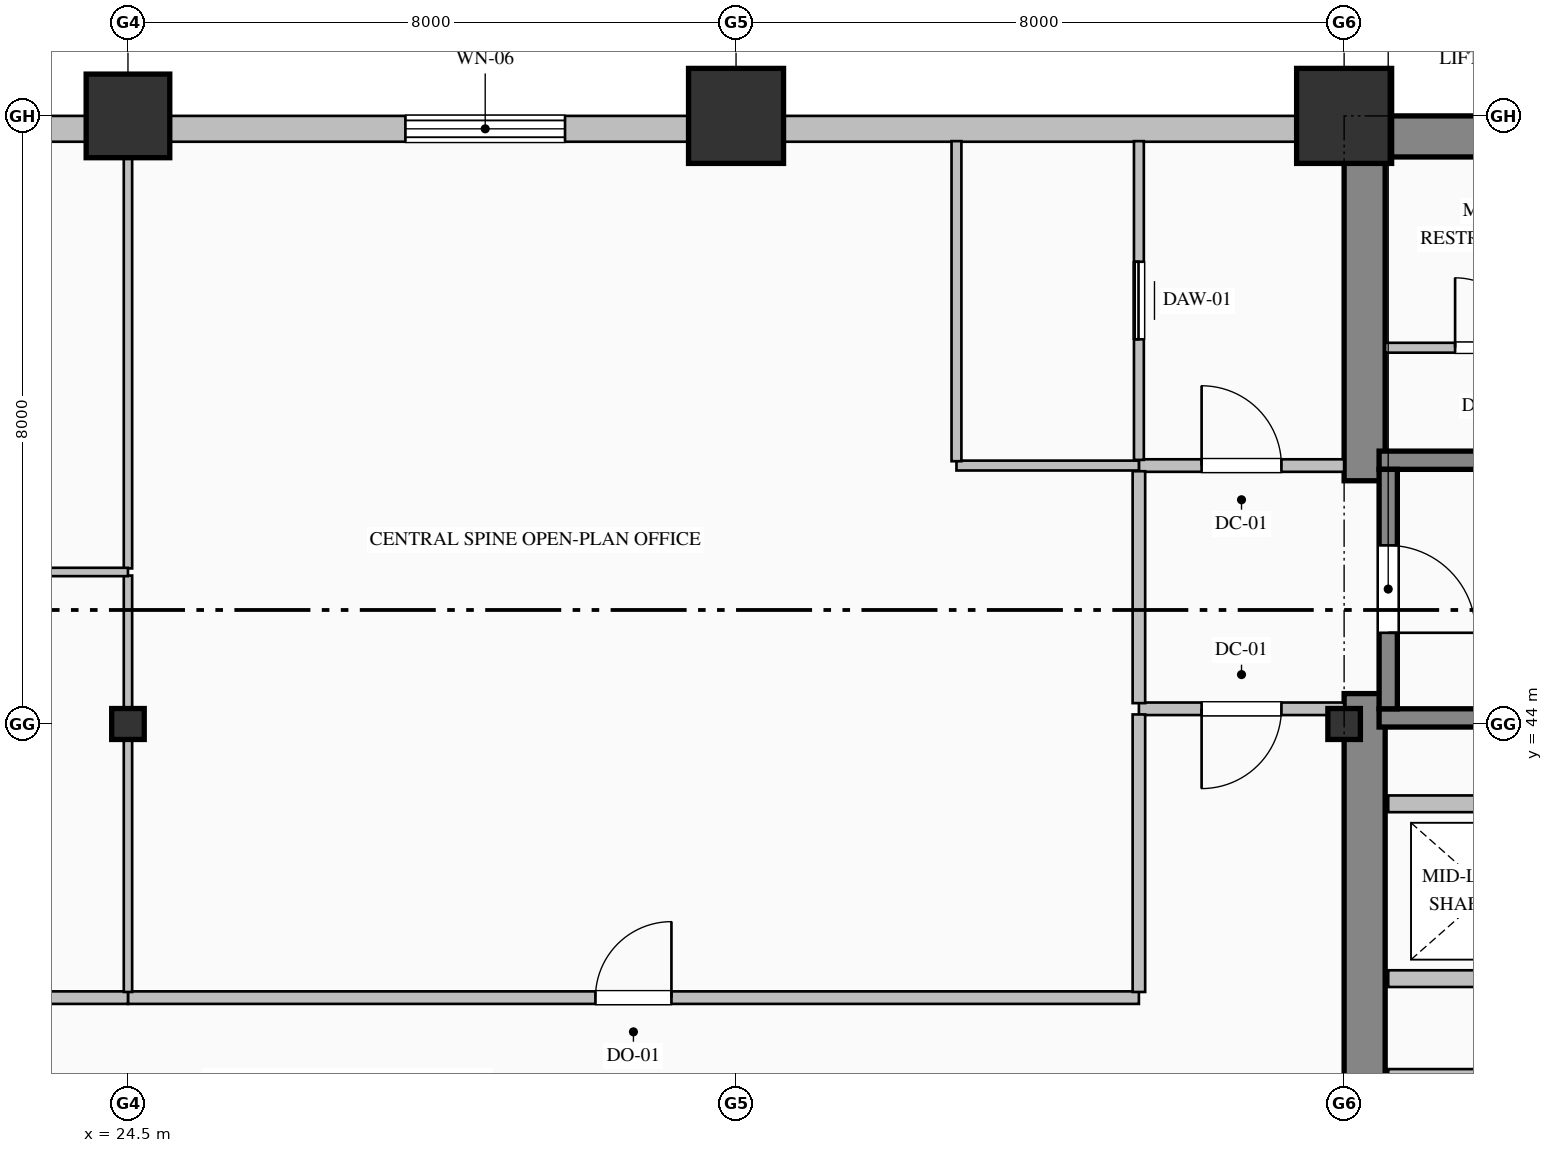
"""IFC4 building model, lengths in metres.
Left out: names, types, materials, properties, quantities, classifications, styles, units other than length and angle.
Written with IfcOpenShell. Run it as: python <this file> out.ifc"""

import sys

from ifc_helpers import new_model, si_unit, direction, frame, frame_2d, origin, origin_2d, place, context, subcontext, project, spatial, rectangle, hollow_rectangle, i_section, extrude, element, fill, save


model = new_model("IFC4")
c1 = context("Model", 3, precision=1e-05, world=origin(), true_north=direction((0.0, 1.0)))
c2 = subcontext(c1, "Body", "Model", "MODEL_VIEW")
j1 = project(units=[si_unit("LENGTHUNIT", "METRE"), si_unit("PLANEANGLEUNIT", "RADIAN")], contexts=[c1])
p1 = place(None, origin())
s1 = spatial("IfcSite", under=j1, at=p1, CompositionType="ELEMENT")
p2 = place(p1, origin())
s2 = spatial("IfcBuilding", under=s1, at=p2, CompositionType="ELEMENT")
p3 = place(p2, frame((0.0, 0.0, 72.2)))
s3 = spatial("IfcBuildingStorey", under=s2, at=p3, CompositionType="ELEMENT", Elevation=72.2)
p4 = place(p3, frame((40.5, 51.73, 0.0), z_axis=(0.0, 0.0, 1.0), x_axis=(1.0, 0.0, 0.0)))
e1 = element("IfcWall", 1, at=p4, inside=s3, PredefinedType="SHEAR", context=c2, shape_type="SweptSolid", body=[
    extrude(rectangle(XDim=23.5, YDim=0.54, at=frame_2d((11.75, 0.0))), origin(), (0.0, 0.0, 1.0), 3.75),
])
p5 = place(p3, frame((40.77, 36.54, 0.0), z_axis=(0.0, 0.0, 1.0), x_axis=(0.0, 1.0, 0.0)))
e2 = element("IfcWall", 2, at=p5, inside=s3, PredefinedType="SHEAR", context=c2, shape_type="SweptSolid", body=[
    extrude(rectangle(XDim=7.86, YDim=0.54, at=frame_2d((3.93, 0.0))), origin(), (0.0, 0.0, 1.0), 3.75),
])
p6 = place(p3, frame((40.77, 47.2, 0.0), z_axis=(0.0, 0.0, 1.0), x_axis=(0.0, 1.0, 0.0)))
e3 = element("IfcWall", 3, at=p6, inside=s3, PredefinedType="SHEAR", context=c2, shape_type="SweptSolid", body=[
    extrude(rectangle(XDim=4.26, YDim=0.54, at=frame_2d((2.13, 0.0))), origin(), (0.0, 0.0, 1.0), 3.75),
])
p7 = place(p3, frame((24.5, 44.0, 0.0), z_axis=(0.0, 0.0, 1.0), x_axis=(1.0, 0.0, 0.0)))
e4 = element("IfcColumn", 4, at=p7, inside=s3, PredefinedType="COLUMN", context=c2, shape_type="SweptSolid", body=[
    extrude(i_section(OverallWidth=0.407, OverallDepth=0.428, WebThickness=0.02, FlangeThickness=0.035, FilletRadius=0.022, at=origin_2d()), origin(), (0.0, 0.0, 1.0), 4.0),
])
p8 = place(p3, frame((24.5, 52.0, 0.0), z_axis=(0.0, 0.0, 1.0), x_axis=(1.0, 0.0, 0.0)))
e5 = element("IfcColumn", 5, at=p8, inside=s3, PredefinedType="COLUMN", context=c2, shape_type="SweptSolid", body=[
    extrude(hollow_rectangle(XDim=1.1, YDim=1.1, WallThickness=0.04, at=origin_2d()), origin(), (0.0, 0.0, 1.0), 4.0),
])
p9 = place(p3, frame((32.5, 52.0, 0.0), z_axis=(0.0, 0.0, 1.0), x_axis=(1.0, 0.0, 0.0)))
e6 = element("IfcColumn", 6, at=p9, inside=s3, PredefinedType="COLUMN", context=c2, shape_type="SweptSolid", body=[
    extrude(hollow_rectangle(XDim=1.25, YDim=1.25, WallThickness=0.045, at=origin_2d()), origin(), (0.0, 0.0, 1.0), 4.0),
])
p10 = place(p3, frame((40.5, 44.0, 0.0), z_axis=(0.0, 0.0, 1.0), x_axis=(1.0, 0.0, 0.0)))
e7 = element("IfcColumn", 7, at=p10, inside=s3, PredefinedType="COLUMN", context=c2, shape_type="SweptSolid", body=[
    extrude(i_section(OverallWidth=0.407, OverallDepth=0.428, WebThickness=0.02, FlangeThickness=0.035, FilletRadius=0.022, at=origin_2d()), origin(), (0.0, 0.0, 1.0), 4.0),
])
p11 = place(p3, frame((40.5, 52.0, 0.0), z_axis=(0.0, 0.0, 1.0), x_axis=(1.0, 0.0, 0.0)))
e8 = element("IfcColumn", 8, at=p11, inside=s3, PredefinedType="COLUMN", context=c2, shape_type="SweptSolid", body=[
    extrude(hollow_rectangle(XDim=1.25, YDim=1.25, WallThickness=0.045, at=origin_2d()), origin(), (0.0, 0.0, 1.0), 4.0),
])
p12 = place(p3, frame((4.0, 51.83, 0.0), z_axis=(0.0, 0.0, 1.0), x_axis=(1.0, 0.0, 0.0)))
e9 = element("IfcWall", 9, at=p12, inside=s3, PredefinedType="SOLIDWALL", context=c2, shape_type="SweptSolid", body=[
    extrude(rectangle(XDim=36.52, YDim=0.34, at=frame_2d((18.26, 0.0))), origin(), (0.0, 0.0, 1.0), 3.25),
])
p13 = place(p12, frame((6.0, 0.0, 0.8)))
e10 = element("IfcOpeningElement", 10, at=p13, cuts=e9, PredefinedType="OPENING", context=c2, shape_type="SweptSolid", body=[
    extrude(rectangle(XDim=2.4, YDim=2.15, at=frame_2d((1.2, 1.075))), frame((0.0, 0.18, 0.0), z_axis=(0.0, -1.0, 0.0), x_axis=(1.0, 0.0, 0.0)), (0.0, 0.0, 1.0), 0.36),
])
p14 = place(p12, frame((16.8, 0.0, 0.8)))
e11 = element("IfcOpeningElement", 11, at=p14, cuts=e9, PredefinedType="OPENING", context=c2, shape_type="SweptSolid", body=[
    extrude(rectangle(XDim=2.4, YDim=2.15, at=frame_2d((1.2, 1.075))), frame((0.0, 0.18, 0.0), z_axis=(0.0, -1.0, 0.0), x_axis=(1.0, 0.0, 0.0)), (0.0, 0.0, 1.0), 0.36),
])
p15 = place(p12, frame((24.15, 0.0, 0.85)))
e12 = element("IfcOpeningElement", 12, at=p15, cuts=e9, PredefinedType="OPENING", context=c2, shape_type="SweptSolid", body=[
    extrude(rectangle(XDim=2.1, YDim=2.05, at=frame_2d((1.05, 1.025))), frame((0.0, 0.18, 0.0), z_axis=(0.0, -1.0, 0.0), x_axis=(1.0, 0.0, 0.0)), (0.0, 0.0, 1.0), 0.36),
])
for number, where, z_axis, x_axis in (
    (13, (40.96, 47.47, 0.0), (0.0, 0.0, 1.0), (1.0, 0.0, 0.0)),
    (14, (49.04, 44.08, 0.0), (0.0, 0.0, 1.0), (-1.0, 0.0, 0.0)),
):
    element("IfcWall", number, at=place(p3, frame(where, z_axis=z_axis, x_axis=x_axis)), inside=s3, PredefinedType="SOLIDWALL", context=c2, shape_type="SweptSolid", body=[
        extrude(rectangle(XDim=8.08, YDim=0.24, at=frame_2d((4.04, 0.0))), origin(), (0.0, 0.0, 1.0), 4.0),
    ])
p16 = place(p3, frame((41.08, 47.35, 0.0), z_axis=(0.0, 0.0, 1.0), x_axis=(0.0, -1.0, 0.0)))
e15 = element("IfcWall", 15, at=p16, inside=s3, PredefinedType="SOLIDWALL", context=c2, shape_type="SweptSolid", body=[
    extrude(rectangle(XDim=3.15, YDim=0.24, at=frame_2d((1.575, 0.0))), origin(), (0.0, 0.0, 1.0), 4.0),
])
p17 = place(p16, frame((1.0, 0.0, 0.0)))
e16 = element("IfcOpeningElement", 16, at=p17, cuts=e15, PredefinedType="OPENING", context=c2, shape_type="SweptSolid", body=[
    extrude(rectangle(XDim=1.15, YDim=2.2, at=frame_2d((0.575, 1.1))), frame((0.0, 0.13, 0.0), z_axis=(0.0, -1.0, 0.0), x_axis=(1.0, 0.0, 0.0)), (0.0, 0.0, 1.0), 0.26),
])
for number, where, z_axis, x_axis in (
    (17, (41.08, 39.35, 0.0), (0.0, 0.0, 1.0), (1.0, 0.0, 0.0)),
    (18, (49.32, 40.65, 0.0), (0.0, 0.0, 1.0), (-1.0, 0.0, 0.0)),
    (19, (41.08, 42.95, 0.0), (0.0, 0.0, 1.0), (1.0, 0.0, 0.0)),
):
    element("IfcWall", number, at=place(p3, frame(where, z_axis=z_axis, x_axis=x_axis)), inside=s3, PredefinedType="PARTITIONING", context=c2, shape_type="SweptSolid", body=[
        extrude(rectangle(XDim=8.24, YDim=0.22, at=frame_2d((4.12, 0.0))), origin(), (0.0, 0.0, 1.0), 3.75),
    ])
p18 = place(p3, frame((37.8, 47.4, 0.0), z_axis=(0.0, 0.0, 1.0), x_axis=(1.0, 0.0, 0.0)))
e20 = element("IfcWall", 20, at=p18, inside=s3, PredefinedType="PARTITIONING", context=c2, shape_type="SweptSolid", body=[
    extrude(rectangle(XDim=2.7, YDim=0.165, at=frame_2d((1.35, 0.0))), origin(), (0.0, 0.0, 1.0), 3.75),
])
p19 = place(p18, frame((0.825, 0.0, 0.0)))
e21 = element("IfcOpeningElement", 21, at=p19, cuts=e20, PredefinedType="OPENING", context=c2, shape_type="SweptSolid", body=[
    extrude(rectangle(XDim=1.05, YDim=2.15, at=frame_2d((0.525, 1.075))), frame((0.0, 0.093, 0.0), z_axis=(0.0, -1.0, 0.0), x_axis=(1.0, 0.0, 0.0)), (0.0, 0.0, 1.0), 0.185),
])
p20 = place(p3, frame((40.5, 44.2, 0.0), z_axis=(0.0, 0.0, 1.0), x_axis=(-1.0, 0.0, 0.0)))
e22 = element("IfcWall", 22, at=p20, inside=s3, PredefinedType="PARTITIONING", context=c2, shape_type="SweptSolid", body=[
    extrude(rectangle(XDim=2.7, YDim=0.165, at=frame_2d((1.35, 0.0))), origin(), (0.0, 0.0, 1.0), 3.75),
])
p21 = place(p20, frame((0.825, 0.0, 0.0)))
e23 = element("IfcOpeningElement", 23, at=p21, cuts=e22, PredefinedType="OPENING", context=c2, shape_type="SweptSolid", body=[
    extrude(rectangle(XDim=1.05, YDim=2.15, at=frame_2d((0.525, 1.075))), frame((0.0, 0.093, 0.0), z_axis=(0.0, -1.0, 0.0), x_axis=(1.0, 0.0, 0.0)), (0.0, 0.0, 1.0), 0.185),
])
p22 = place(p3, frame((37.8, 44.274, 0.0), z_axis=(0.0, 0.0, 1.0), x_axis=(0.0, 1.0, 0.0)))
e24 = element("IfcWall", 24, at=p22, inside=s3, PredefinedType="PARTITIONING", context=c2, shape_type="SweptSolid", body=[
    extrude(rectangle(XDim=3.051, YDim=0.165, at=frame_2d((1.525, 0.0))), origin(), (0.0, 0.0, 1.0), 3.75),
])
p23 = place(p3, frame((37.8, 47.475, 0.0), z_axis=(0.0, 0.0, 1.0), x_axis=(0.0, 1.0, 0.0)))
e25 = element("IfcWall", 25, at=p23, inside=s3, PredefinedType="PARTITIONING", context=c2, shape_type="SweptSolid", body=[
    extrude(rectangle(XDim=4.193, YDim=0.13, at=frame_2d((2.097, 0.0))), origin(), (0.0, 0.0, 1.0), 3.75),
])
p24 = place(p23, frame((1.587, 0.0, 0.0)))
e26 = element("IfcOpeningElement", 26, at=p24, cuts=e25, PredefinedType="OPENING", context=c2, shape_type="SweptSolid", body=[
    extrude(rectangle(XDim=1.02, YDim=2.15, at=frame_2d((0.51, 1.075))), frame((0.0, 0.075, 0.0), z_axis=(0.0, -1.0, 0.0), x_axis=(1.0, 0.0, 0.0)), (0.0, 0.0, 1.0), 0.15),
])
p25 = place(p3, frame((37.8, 47.4, 0.0), z_axis=(0.0, 0.0, 1.0), x_axis=(-1.0, 0.0, 0.0)))
e27 = element("IfcWall", 27, at=p25, inside=s3, PredefinedType="PARTITIONING", context=c2, shape_type="SweptSolid", body=[
    extrude(rectangle(XDim=2.4, YDim=0.13, at=frame_2d((1.2, 0.0))), origin(), (0.0, 0.0, 1.0), 3.75),
])
p26 = place(p3, frame((35.4, 47.457, 0.0), z_axis=(0.0, 0.0, 1.0), x_axis=(0.0, 1.0, 0.0)))
e28 = element("IfcWall", 28, at=p26, inside=s3, PredefinedType="PARTITIONING", context=c2, shape_type="SweptSolid", body=[
    extrude(rectangle(XDim=4.211, YDim=0.13, at=frame_2d((2.105, 0.0))), origin(), (0.0, 0.0, 1.0), 3.75),
])
p27 = place(p3, frame((41.04, 48.95, 0.0), z_axis=(0.0, 0.0, 1.0), x_axis=(1.0, 0.0, 0.0)))
e29 = element("IfcWall", 29, at=p27, inside=s3, PredefinedType="PARTITIONING", context=c2, shape_type="SweptSolid", body=[
    extrude(rectangle(XDim=2.76, YDim=0.13, at=frame_2d((1.38, 0.0))), origin(), (0.0, 0.0, 1.0), 3.75),
])
p28 = place(p27, frame((0.92, 0.0, 0.0)))
e30 = element("IfcOpeningElement", 30, at=p28, cuts=e29, PredefinedType="OPENING", context=c2, shape_type="SweptSolid", body=[
    extrude(rectangle(XDim=0.92, YDim=2.15, at=frame_2d((0.46, 1.075))), frame((0.0, 0.075, 0.0), z_axis=(0.0, -1.0, 0.0), x_axis=(1.0, 0.0, 0.0)), (0.0, 0.0, 1.0), 0.15),
])
p29 = place(p3, frame((24.5, 40.4, 0.0), z_axis=(0.0, 0.0, 1.0), x_axis=(1.0, 0.0, 0.0)))
e31 = element("IfcWall", 31, at=p29, inside=s3, PredefinedType="PARTITIONING", context=c2, shape_type="SweptSolid", body=[
    extrude(rectangle(XDim=13.3, YDim=0.165, at=frame_2d((6.65, 0.0))), origin(), (0.0, 0.0, 1.0), 3.75),
])
p30 = place(p29, frame((6.15, 0.0, 0.0)))
e32 = element("IfcOpeningElement", 32, at=p30, cuts=e31, PredefinedType="OPENING", context=c2, shape_type="SweptSolid", body=[
    extrude(rectangle(XDim=1.0, YDim=2.15, at=frame_2d((0.5, 1.075))), frame((0.0, 0.093, 0.0), z_axis=(0.0, -1.0, 0.0), x_axis=(1.0, 0.0, 0.0)), (0.0, 0.0, 1.0), 0.185),
])
p31 = place(p3, frame((9.0, 40.4, 0.0), z_axis=(0.0, 0.0, 1.0), x_axis=(1.0, 0.0, 0.0)))
e33 = element("IfcWall", 33, at=p31, inside=s3, PredefinedType="PARTITIONING", context=c2, shape_type="SweptSolid", body=[
    extrude(rectangle(XDim=15.5, YDim=0.165, at=frame_2d((7.75, 0.0))), origin(), (0.0, 0.0, 1.0), 3.75),
])
p32 = place(p31, frame((7.25, 0.0, 0.0)))
e34 = element("IfcOpeningElement", 34, at=p32, cuts=e33, PredefinedType="OPENING", context=c2, shape_type="SweptSolid", body=[
    extrude(rectangle(XDim=1.0, YDim=2.15, at=frame_2d((0.5, 1.075))), frame((0.0, 0.093, 0.0), z_axis=(0.0, -1.0, 0.0), x_axis=(1.0, 0.0, 0.0)), (0.0, 0.0, 1.0), 0.185),
])
p33 = place(p3, frame((37.8, 40.475, 0.0), z_axis=(0.0, 0.0, 1.0), x_axis=(0.0, 1.0, 0.0)))
e35 = element("IfcWall", 35, at=p33, inside=s3, PredefinedType="PARTITIONING", context=c2, shape_type="SweptSolid", body=[
    extrude(rectangle(XDim=3.651, YDim=0.165, at=frame_2d((1.825, 0.0))), origin(), (0.0, 0.0, 1.0), 3.75),
])
p34 = place(p3, frame((24.5, 40.475, 0.0), z_axis=(0.0, 0.0, 1.0), x_axis=(0.0, 1.0, 0.0)))
e36 = element("IfcWall", 36, at=p34, inside=s3, PredefinedType="MOVABLE", context=c2, shape_type="SweptSolid", body=[
    extrude(rectangle(XDim=5.478, YDim=0.11, at=frame_2d((2.739, 0.0))), origin(), (0.0, 0.0, 1.0), 3.042),
])
p35 = place(p3, frame((24.5, 46.047, 0.0), z_axis=(0.0, 0.0, 1.0), x_axis=(0.0, 1.0, 0.0)))
e37 = element("IfcWall", 37, at=p35, inside=s3, PredefinedType="MOVABLE", context=c2, shape_type="SweptSolid", body=[
    extrude(rectangle(XDim=5.621, YDim=0.11, at=frame_2d((2.811, 0.0))), origin(), (0.0, 0.0, 1.0), 3.042),
])
p36 = place(p3, frame((0.332, 46.0, 0.0), z_axis=(0.0, 0.0, 1.0), x_axis=(1.0, 0.0, 0.0)))
e38 = element("IfcWall", 38, at=p36, inside=s3, PredefinedType="MOVABLE", context=c2, shape_type="SweptSolid", body=[
    extrude(rectangle(XDim=24.168, YDim=0.11, at=frame_2d((12.084, 0.0))), origin(), (0.0, 0.0, 1.0), 3.75),
])
p37 = place(p36, frame((11.584, 0.0, 0.0)))
e39 = element("IfcOpeningElement", 39, at=p37, cuts=e38, PredefinedType="OPENING", context=c2, shape_type="SweptSolid", body=[
    extrude(rectangle(XDim=1.0, YDim=2.15, at=frame_2d((0.5, 1.075))), frame((0.0, 0.065, 0.0), z_axis=(0.0, -1.0, 0.0), x_axis=(1.0, 0.0, 0.0)), (0.0, 0.0, 1.0), 0.13),
])
p38 = place(p15, origin())
e40 = element("IfcWindow", 40, at=p38, inside=s3, PartitioningType="TRIPLE_PANEL_VERTICAL", PredefinedType="WINDOW", context=c2, shape_type="SweptSolid", body=[
    extrude(rectangle(XDim=2.1, YDim=2.05, at=frame_2d((1.05, 1.025))), frame((0.0, 0.15, 0.0), z_axis=(0.0, -1.0, 0.0), x_axis=(1.0, 0.0, 0.0)), (0.0, 0.0, 1.0), 0.06),
])
fill(e12, e40)
p39 = place(p17, origin())
e41 = element("IfcDoor", 41, at=p39, inside=s3, OperationType="SINGLE_SWING_RIGHT", PredefinedType="DOOR", context=c2, shape_type="SweptSolid", body=[
    extrude(rectangle(XDim=1.15, YDim=2.2, at=frame_2d((0.575, 1.1))), frame((0.0, 0.025, 0.0), z_axis=(0.0, -1.0, 0.0), x_axis=(1.0, 0.0, 0.0)), (0.0, 0.0, 1.0), 0.05),
])
fill(e16, e41)
p40 = place(p19, origin())
e42 = element("IfcDoor", 42, at=p40, inside=s3, OperationType="SINGLE_SWING_LEFT", PredefinedType="DOOR", context=c2, shape_type="SweptSolid", body=[
    extrude(rectangle(XDim=1.05, YDim=2.15, at=frame_2d((0.525, 1.075))), frame((0.0, 0.025, 0.0), z_axis=(0.0, -1.0, 0.0), x_axis=(1.0, 0.0, 0.0)), (0.0, 0.0, 1.0), 0.05),
])
fill(e21, e42)
p41 = place(p21, origin())
e43 = element("IfcDoor", 43, at=p41, inside=s3, OperationType="SINGLE_SWING_RIGHT", PredefinedType="DOOR", context=c2, shape_type="SweptSolid", body=[
    extrude(rectangle(XDim=1.05, YDim=2.15, at=frame_2d((0.525, 1.075))), frame((0.0, 0.025, 0.0), z_axis=(0.0, -1.0, 0.0), x_axis=(1.0, 0.0, 0.0)), (0.0, 0.0, 1.0), 0.05),
])
fill(e23, e43)
p42 = place(p24, origin())
e44 = element("IfcDoor", 44, at=p42, inside=s3, OperationType="SLIDING_TO_LEFT", PredefinedType="DOOR", context=c2, shape_type="SweptSolid", body=[
    extrude(rectangle(XDim=1.02, YDim=2.15, at=frame_2d((0.51, 1.075))), frame((0.0, 0.025, 0.0), z_axis=(0.0, -1.0, 0.0), x_axis=(1.0, 0.0, 0.0)), (0.0, 0.0, 1.0), 0.05),
])
fill(e26, e44)
p43 = place(p28, origin())
e45 = element("IfcDoor", 45, at=p43, inside=s3, OperationType="SINGLE_SWING_LEFT", PredefinedType="DOOR", context=c2, shape_type="SweptSolid", body=[
    extrude(rectangle(XDim=0.92, YDim=2.15, at=frame_2d((0.46, 1.075))), frame((0.0, 0.025, 0.0), z_axis=(0.0, -1.0, 0.0), x_axis=(1.0, 0.0, 0.0)), (0.0, 0.0, 1.0), 0.05),
])
fill(e30, e45)
p44 = place(p30, origin())
e46 = element("IfcDoor", 46, at=p44, inside=s3, OperationType="SINGLE_SWING_RIGHT", PredefinedType="DOOR", context=c2, shape_type="SweptSolid", body=[
    extrude(rectangle(XDim=1.0, YDim=2.15, at=frame_2d((0.5, 1.075))), frame((0.0, 0.025, 0.0), z_axis=(0.0, -1.0, 0.0), x_axis=(1.0, 0.0, 0.0)), (0.0, 0.0, 1.0), 0.05),
])
fill(e32, e46)
save(model, sys.argv[1])
